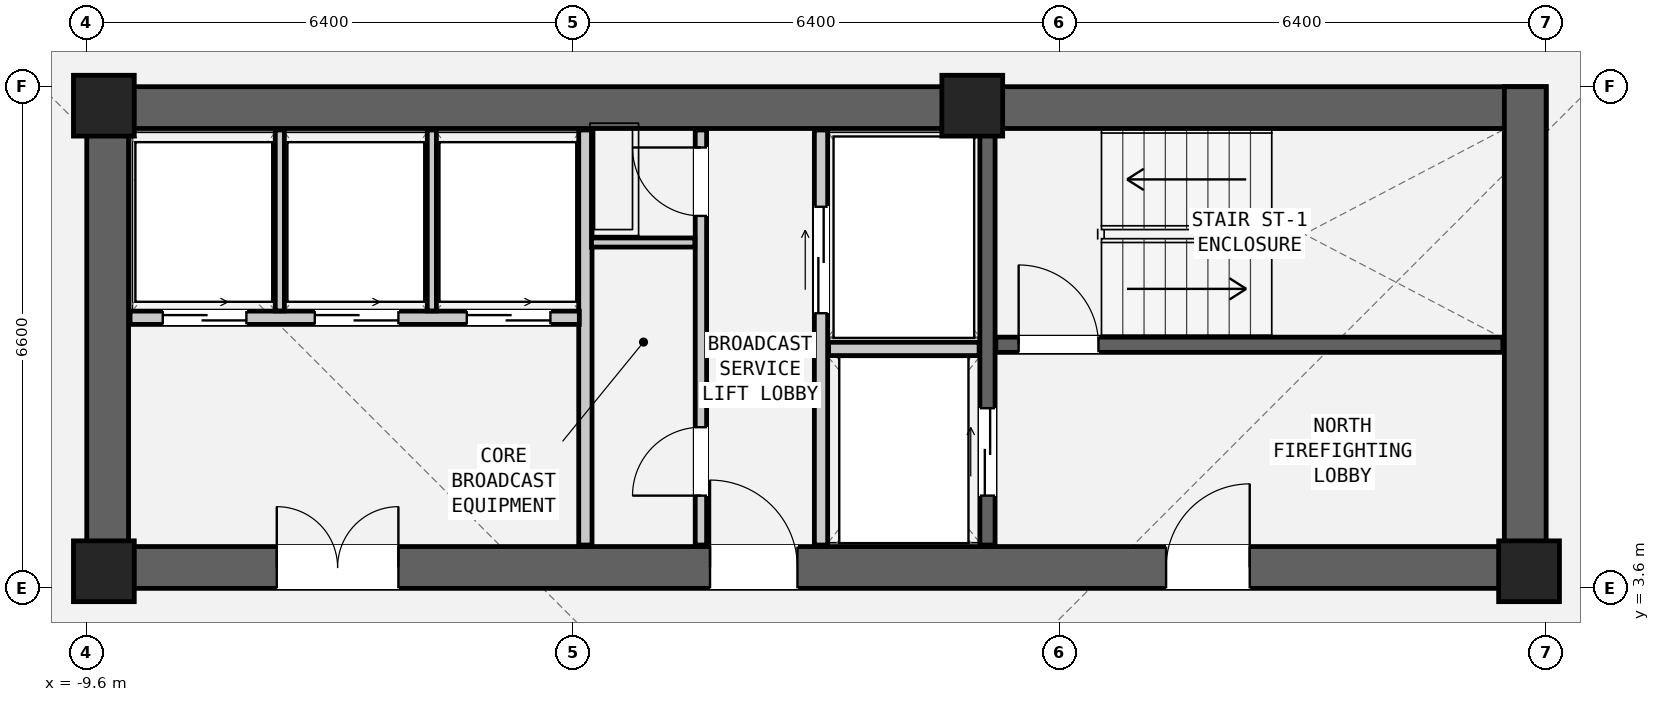
"""IFC4 building model, lengths in metres.
Left out: names, types, materials, properties, quantities, classifications, styles, units other than length and angle.
Written with IfcOpenShell. Run it as: python <this file> out.ifc"""

import sys

from ifc_helpers import new_model, si_unit, direction, frame, frame_2d, origin, origin_2d, place, context, subcontext, project, spatial, rectangle, extrude, element, fill, save


model = new_model("IFC4")
c1 = context("Model", 3, precision=1e-05, world=origin(), true_north=direction((0.0, 1.0)))
c2 = subcontext(c1, "Body", "Model", "MODEL_VIEW")
j1 = project(units=[si_unit("LENGTHUNIT", "METRE"), si_unit("PLANEANGLEUNIT", "RADIAN")], contexts=[c1])
p1 = place(None, origin())
s1 = spatial("IfcSite", under=j1, at=p1, CompositionType="ELEMENT")
p2 = place(p1, origin())
s2 = spatial("IfcBuilding", under=s1, at=p2, CompositionType="ELEMENT")
p3 = place(p2, frame((0.0, 0.0, 26.1)))
s3 = spatial("IfcBuildingStorey", under=s2, at=p3, CompositionType="ELEMENT", Elevation=26.1)
p4 = place(p3, frame((-9.6, 9.925, 0.0), z_axis=(0.0, 0.0, 1.0), x_axis=(1.0, 0.0, 0.0)))
e1 = element("IfcWall", 1, at=p4, inside=s3, PredefinedType="SHEAR", context=c2, shape_type="SweptSolid", body=[
    extrude(rectangle(XDim=19.2, YDim=0.55, at=frame_2d((9.6, 0.0))), origin(), (0.0, 0.0, 1.0), 3.05),
])
p5 = place(p3, frame((-9.6, 3.875, 0.0), z_axis=(0.0, 0.0, 1.0), x_axis=(1.0, 0.0, 0.0)))
e2 = element("IfcWall", 2, at=p5, inside=s3, PredefinedType="SHEAR", context=c2, shape_type="SweptSolid", body=[
    extrude(rectangle(XDim=19.2, YDim=0.55, at=frame_2d((9.6, 0.0))), origin(), (0.0, 0.0, 1.0), 3.05),
])
p6 = place(p5, frame((14.2, 0.0, 0.0)))
e3 = element("IfcOpeningElement", 3, at=p6, cuts=e2, PredefinedType="OPENING", context=c2, shape_type="SweptSolid", body=[
    extrude(rectangle(XDim=1.1, YDim=2.08, at=frame_2d((0.55, 1.04))), frame((0.0, 0.287, 0.0), z_axis=(0.0, -1.0, 0.0), x_axis=(1.0, 0.0, 0.0)), (0.0, 0.0, 1.0), 0.574),
])
p7 = place(p5, frame((8.2, 0.0, 0.0)))
e4 = element("IfcOpeningElement", 4, at=p7, cuts=e2, PredefinedType="OPENING", context=c2, shape_type="SweptSolid", body=[
    extrude(rectangle(XDim=1.15, YDim=2.1, at=frame_2d((0.575, 1.05))), frame((0.0, 0.287, 0.0), z_axis=(0.0, -1.0, 0.0), x_axis=(1.0, 0.0, 0.0)), (0.0, 0.0, 1.0), 0.574),
])
p8 = place(p5, frame((2.5, 0.0, 0.0)))
e5 = element("IfcOpeningElement", 5, at=p8, cuts=e2, PredefinedType="OPENING", context=c2, shape_type="SweptSolid", body=[
    extrude(rectangle(XDim=1.6, YDim=2.12, at=frame_2d((0.8, 1.06))), frame((0.0, 0.287, 0.0), z_axis=(0.0, -1.0, 0.0), x_axis=(1.0, 0.0, 0.0)), (0.0, 0.0, 1.0), 0.574),
])
for number, where, z_axis, x_axis in (
    (6, (-9.325, 3.6, 0.0), (0.0, 0.0, 1.0), (0.0, 1.0, 0.0)),
    (7, (9.325, 3.6, 0.0), (0.0, 0.0, 1.0), (0.0, 1.0, 0.0)),
):
    element("IfcWall", number, at=place(p3, frame(where, z_axis=z_axis, x_axis=x_axis)), inside=s3, PredefinedType="SHEAR", context=c2, shape_type="SweptSolid", body=[
        extrude(rectangle(XDim=6.6, YDim=0.55, at=frame_2d((3.3, 0.0))), origin(), (0.0, 0.0, 1.0), 3.05),
    ])
for number, where, z_axis, x_axis in (
    (8, (-9.375, 9.95, 0.0), (0.0, 0.0, 1.0), (1.0, 0.0, 0.0)),
    (9, (2.05, 9.95, 0.0), (0.0, 0.0, 1.0), (1.0, 0.0, 0.0)),
    (10, (-9.375, 3.825, 0.0), (0.0, 0.0, 1.0), (1.0, 0.0, 0.0)),
    (11, (9.375, 3.825, 0.0), (0.0, 0.0, 1.0), (1.0, 0.0, 0.0)),
):
    element("IfcColumn", number, at=place(p3, frame(where, z_axis=z_axis, x_axis=x_axis)), inside=s3, PredefinedType="COLUMN", context=c2, shape_type="SweptSolid", body=[
        extrude(rectangle(XDim=0.8, YDim=0.8, at=origin_2d()), origin(), (0.0, 0.0, 1.0), 3.05),
    ])
p9 = place(p3, frame((2.36, 6.805, 0.0), z_axis=(0.0, 0.0, 1.0), x_axis=(1.0, 0.0, 0.0)))
e12 = element("IfcWall", 12, at=p9, inside=s3, PredefinedType="SHEAR", context=c2, shape_type="SweptSolid", body=[
    extrude(rectangle(XDim=6.67, YDim=0.2, at=frame_2d((3.335, 0.0))), origin(), (0.0, 0.0, 1.0), 2.83),
])
p10 = place(p9, frame((0.3, 0.0, 0.0)))
e13 = element("IfcOpeningElement", 13, at=p10, cuts=e12, PredefinedType="OPENING", context=c2, shape_type="SweptSolid", body=[
    extrude(rectangle(XDim=1.05, YDim=2.08, at=frame_2d((0.525, 1.04))), frame((0.0, 0.112, 0.0), z_axis=(0.0, -1.0, 0.0), x_axis=(1.0, 0.0, 0.0)), (0.0, 0.0, 1.0), 0.224),
])
p11 = place(p3, frame((2.25, 4.17, 0.0), z_axis=(0.0, 0.0, 1.0), x_axis=(0.0, 1.0, 0.0)))
e14 = element("IfcWall", 14, at=p11, inside=s3, PredefinedType="SHEAR", context=c2, shape_type="SweptSolid", body=[
    extrude(rectangle(XDim=5.46, YDim=0.2, at=frame_2d((2.73, 0.0))), origin(), (0.0, 0.0, 1.0), 2.83),
])
p12 = place(p11, frame((0.65, 0.0, 0.0)))
e15 = element("IfcOpeningElement", 15, at=p12, cuts=e14, PredefinedType="OPENING", context=c2, shape_type="SweptSolid", body=[
    extrude(rectangle(XDim=1.15, YDim=2.08, at=frame_2d((0.575, 1.04))), frame((0.0, 0.112, 0.0), z_axis=(0.0, -1.0, 0.0), x_axis=(1.0, 0.0, 0.0)), (0.0, 0.0, 1.0), 0.224),
])
p13 = place(p3, frame((0.06, 4.17, 0.0), z_axis=(0.0, 0.0, 1.0), x_axis=(0.0, 1.0, 0.0)))
e16 = element("IfcWall", 16, at=p13, inside=s3, PredefinedType="PARTITIONING", context=c2, shape_type="SweptSolid", body=[
    extrude(rectangle(XDim=5.46, YDim=0.175, at=frame_2d((2.73, 0.0))), origin(), (0.0, 0.0, 1.0), 2.83),
])
p14 = place(p13, frame((3.05, 0.0, 0.0)))
e17 = element("IfcOpeningElement", 17, at=p14, cuts=e16, PredefinedType="OPENING", context=c2, shape_type="SweptSolid", body=[
    extrude(rectangle(XDim=1.4, YDim=2.12, at=frame_2d((0.7, 1.06))), frame((0.0, 0.1, 0.0), z_axis=(0.0, -1.0, 0.0), x_axis=(1.0, 0.0, 0.0)), (0.0, 0.0, 1.0), 0.199),
])
p15 = place(p3, frame((0.16, 6.75, 0.0), z_axis=(0.0, 0.0, 1.0), x_axis=(1.0, 0.0, 0.0)))
e18 = element("IfcWall", 18, at=p15, inside=s3, PredefinedType="PARTITIONING", context=c2, shape_type="SweptSolid", body=[
    extrude(rectangle(XDim=1.98, YDim=0.175, at=frame_2d((0.99, 0.0))), origin(), (0.0, 0.0, 1.0), 2.83),
])
p16 = place(p3, frame((-3.04, 4.17, 0.0), z_axis=(0.0, 0.0, 1.0), x_axis=(0.0, 1.0, 0.0)))
e19 = element("IfcWall", 19, at=p16, inside=s3, PredefinedType="PARTITIONING", context=c2, shape_type="SweptSolid", body=[
    extrude(rectangle(XDim=5.46, YDim=0.175, at=frame_2d((2.73, 0.0))), origin(), (0.0, 0.0, 1.0), 2.83),
])
p17 = place(p3, frame((-1.52, 4.17, 0.0), z_axis=(0.0, 0.0, 1.0), x_axis=(0.0, 1.0, 0.0)))
e20 = element("IfcWall", 20, at=p17, inside=s3, PredefinedType="PARTITIONING", context=c2, shape_type="SweptSolid", body=[
    extrude(rectangle(XDim=5.46, YDim=0.15, at=frame_2d((2.73, 0.0))), origin(), (0.0, 0.0, 1.0), 2.83),
])
p18 = place(p17, frame((4.33, 0.0, 0.0)))
e21 = element("IfcOpeningElement", 21, at=p18, cuts=e20, PredefinedType="OPENING", context=c2, shape_type="SweptSolid", body=[
    extrude(rectangle(XDim=0.9, YDim=2.05, at=frame_2d((0.45, 1.025))), frame((0.0, 0.087, 0.0), z_axis=(0.0, -1.0, 0.0), x_axis=(1.0, 0.0, 0.0)), (0.0, 0.0, 1.0), 0.174),
])
p19 = place(p17, frame((0.65, 0.0, 0.0)))
e22 = element("IfcOpeningElement", 22, at=p19, cuts=e20, PredefinedType="OPENING", context=c2, shape_type="SweptSolid", body=[
    extrude(rectangle(XDim=0.9, YDim=2.05, at=frame_2d((0.45, 1.025))), frame((0.0, 0.087, 0.0), z_axis=(0.0, -1.0, 0.0), x_axis=(1.0, 0.0, 0.0)), (0.0, 0.0, 1.0), 0.174),
])
p20 = place(p3, frame((-2.96, 8.15, 0.0), z_axis=(0.0, 0.0, 1.0), x_axis=(1.0, 0.0, 0.0)))
e23 = element("IfcWall", 23, at=p20, inside=s3, PredefinedType="PARTITIONING", context=c2, shape_type="SweptSolid", body=[
    extrude(rectangle(XDim=1.36, YDim=0.12, at=frame_2d((0.68, 0.0))), origin(), (0.0, 0.0, 1.0), 2.83),
])
p21 = place(p3, frame((-9.03, 7.16, 0.0), z_axis=(0.0, 0.0, 1.0), x_axis=(1.0, 0.0, 0.0)))
e24 = element("IfcWall", 24, at=p21, inside=s3, PredefinedType="PARTITIONING", context=c2, shape_type="SweptSolid", body=[
    extrude(rectangle(XDim=5.91, YDim=0.175, at=frame_2d((2.955, 0.0))), origin(), (0.0, 0.0, 1.0), 2.83),
])
p22 = place(p21, frame((0.43, 0.0, 0.0)))
e25 = element("IfcOpeningElement", 25, at=p22, cuts=e24, PredefinedType="OPENING", context=c2, shape_type="SweptSolid", body=[
    extrude(rectangle(XDim=1.1, YDim=2.06, at=frame_2d((0.55, 1.03))), frame((0.0, 0.1, 0.0), z_axis=(0.0, -1.0, 0.0), x_axis=(1.0, 0.0, 0.0)), (0.0, 0.0, 1.0), 0.199),
])
p23 = place(p21, frame((2.43, 0.0, 0.0)))
e26 = element("IfcOpeningElement", 26, at=p23, cuts=e24, PredefinedType="OPENING", context=c2, shape_type="SweptSolid", body=[
    extrude(rectangle(XDim=1.1, YDim=2.06, at=frame_2d((0.55, 1.03))), frame((0.0, 0.1, 0.0), z_axis=(0.0, -1.0, 0.0), x_axis=(1.0, 0.0, 0.0)), (0.0, 0.0, 1.0), 0.199),
])
p24 = place(p21, frame((4.43, 0.0, 0.0)))
e27 = element("IfcOpeningElement", 27, at=p24, cuts=e24, PredefinedType="OPENING", context=c2, shape_type="SweptSolid", body=[
    extrude(rectangle(XDim=1.1, YDim=2.06, at=frame_2d((0.55, 1.03))), frame((0.0, 0.1, 0.0), z_axis=(0.0, -1.0, 0.0), x_axis=(1.0, 0.0, 0.0)), (0.0, 0.0, 1.0), 0.199),
])
for number, where, z_axis, x_axis in (
    (28, (-7.06, 7.25, 0.0), (0.0, 0.0, 1.0), (0.0, 1.0, 0.0)),
    (29, (-5.06, 7.25, 0.0), (0.0, 0.0, 1.0), (0.0, 1.0, 0.0)),
):
    element("IfcWall", number, at=place(p3, frame(where, z_axis=z_axis, x_axis=x_axis)), inside=s3, PredefinedType="PARTITIONING", context=c2, shape_type="SweptSolid", body=[
        extrude(rectangle(XDim=2.38, YDim=0.12, at=frame_2d((1.19, 0.0))), origin(), (0.0, 0.0, 1.0), 2.83),
    ])
p25 = place(p10, origin())
e30 = element("IfcDoor", 30, at=p25, inside=s3, OperationType="SINGLE_SWING_LEFT", PredefinedType="DOOR", context=c2, shape_type="SweptSolid", body=[
    extrude(rectangle(XDim=1.05, YDim=2.08, at=frame_2d((0.525, 1.04))), frame((0.0, 0.025, 0.0), z_axis=(0.0, -1.0, 0.0), x_axis=(1.0, 0.0, 0.0)), (0.0, 0.0, 1.0), 0.05),
])
fill(e13, e30)
p26 = place(p6, origin())
e31 = element("IfcDoor", 31, at=p26, inside=s3, OperationType="SINGLE_SWING_RIGHT", PredefinedType="DOOR", context=c2, shape_type="SweptSolid", body=[
    extrude(rectangle(XDim=1.1, YDim=2.08, at=frame_2d((0.55, 1.04))), frame((0.0, 0.025, 0.0), z_axis=(0.0, -1.0, 0.0), x_axis=(1.0, 0.0, 0.0)), (0.0, 0.0, 1.0), 0.05),
])
fill(e3, e31)
p27 = place(p12, origin())
e32 = element("IfcDoor", 32, at=p27, inside=s3, OperationType="DOUBLE_DOOR_SLIDING", PredefinedType="DOOR", context=c2, shape_type="SweptSolid", body=[
    extrude(rectangle(XDim=1.15, YDim=2.08, at=frame_2d((0.575, 1.04))), frame((0.0, 0.025, 0.0), z_axis=(0.0, -1.0, 0.0), x_axis=(1.0, 0.0, 0.0)), (0.0, 0.0, 1.0), 0.05),
])
fill(e15, e32)
p28 = place(p14, origin())
e33 = element("IfcDoor", 33, at=p28, inside=s3, OperationType="DOUBLE_DOOR_SLIDING", PredefinedType="DOOR", context=c2, shape_type="SweptSolid", body=[
    extrude(rectangle(XDim=1.4, YDim=2.12, at=frame_2d((0.7, 1.06))), frame((0.0, 0.025, 0.0), z_axis=(0.0, -1.0, 0.0), x_axis=(1.0, 0.0, 0.0)), (0.0, 0.0, 1.0), 0.05),
])
fill(e17, e33)
p29 = place(p7, origin())
e34 = element("IfcDoor", 34, at=p29, inside=s3, OperationType="SINGLE_SWING_LEFT", PredefinedType="DOOR", context=c2, shape_type="SweptSolid", body=[
    extrude(rectangle(XDim=1.15, YDim=2.1, at=frame_2d((0.575, 1.05))), frame((0.0, 0.025, 0.0), z_axis=(0.0, -1.0, 0.0), x_axis=(1.0, 0.0, 0.0)), (0.0, 0.0, 1.0), 0.05),
])
fill(e4, e34)
p30 = place(p18, origin())
e35 = element("IfcDoor", 35, at=p30, inside=s3, OperationType="SINGLE_SWING_RIGHT", PredefinedType="DOOR", context=c2, shape_type="SweptSolid", body=[
    extrude(rectangle(XDim=0.9, YDim=2.05, at=frame_2d((0.45, 1.025))), frame((0.0, 0.025, 0.0), z_axis=(0.0, -1.0, 0.0), x_axis=(1.0, 0.0, 0.0)), (0.0, 0.0, 1.0), 0.05),
])
fill(e21, e35)
p31 = place(p19, origin())
e36 = element("IfcDoor", 36, at=p31, inside=s3, OperationType="SINGLE_SWING_LEFT", PredefinedType="DOOR", context=c2, shape_type="SweptSolid", body=[
    extrude(rectangle(XDim=0.9, YDim=2.05, at=frame_2d((0.45, 1.025))), frame((0.0, 0.025, 0.0), z_axis=(0.0, -1.0, 0.0), x_axis=(1.0, 0.0, 0.0)), (0.0, 0.0, 1.0), 0.05),
])
fill(e22, e36)
p32 = place(p22, origin())
e37 = element("IfcDoor", 37, at=p32, inside=s3, OperationType="DOUBLE_DOOR_SLIDING", PredefinedType="DOOR", context=c2, shape_type="SweptSolid", body=[
    extrude(rectangle(XDim=1.1, YDim=2.06, at=frame_2d((0.55, 1.03))), frame((0.0, 0.025, 0.0), z_axis=(0.0, -1.0, 0.0), x_axis=(1.0, 0.0, 0.0)), (0.0, 0.0, 1.0), 0.05),
])
fill(e25, e37)
p33 = place(p23, origin())
e38 = element("IfcDoor", 38, at=p33, inside=s3, OperationType="DOUBLE_DOOR_SLIDING", PredefinedType="DOOR", context=c2, shape_type="SweptSolid", body=[
    extrude(rectangle(XDim=1.1, YDim=2.06, at=frame_2d((0.55, 1.03))), frame((0.0, 0.025, 0.0), z_axis=(0.0, -1.0, 0.0), x_axis=(1.0, 0.0, 0.0)), (0.0, 0.0, 1.0), 0.05),
])
fill(e26, e38)
p34 = place(p24, origin())
e39 = element("IfcDoor", 39, at=p34, inside=s3, OperationType="DOUBLE_DOOR_SLIDING", PredefinedType="DOOR", context=c2, shape_type="SweptSolid", body=[
    extrude(rectangle(XDim=1.1, YDim=2.06, at=frame_2d((0.55, 1.03))), frame((0.0, 0.025, 0.0), z_axis=(0.0, -1.0, 0.0), x_axis=(1.0, 0.0, 0.0)), (0.0, 0.0, 1.0), 0.05),
])
fill(e27, e39)
p35 = place(p8, origin())
e40 = element("IfcDoor", 40, at=p35, inside=s3, OperationType="DOUBLE_DOOR_SINGLE_SWING", PredefinedType="DOOR", context=c2, shape_type="SweptSolid", body=[
    extrude(rectangle(XDim=1.6, YDim=2.12, at=frame_2d((0.8, 1.06))), frame((0.0, 0.025, 0.0), z_axis=(0.0, -1.0, 0.0), x_axis=(1.0, 0.0, 0.0)), (0.0, 0.0, 1.0), 0.05),
])
fill(e5, e40)
save(model, sys.argv[1])
